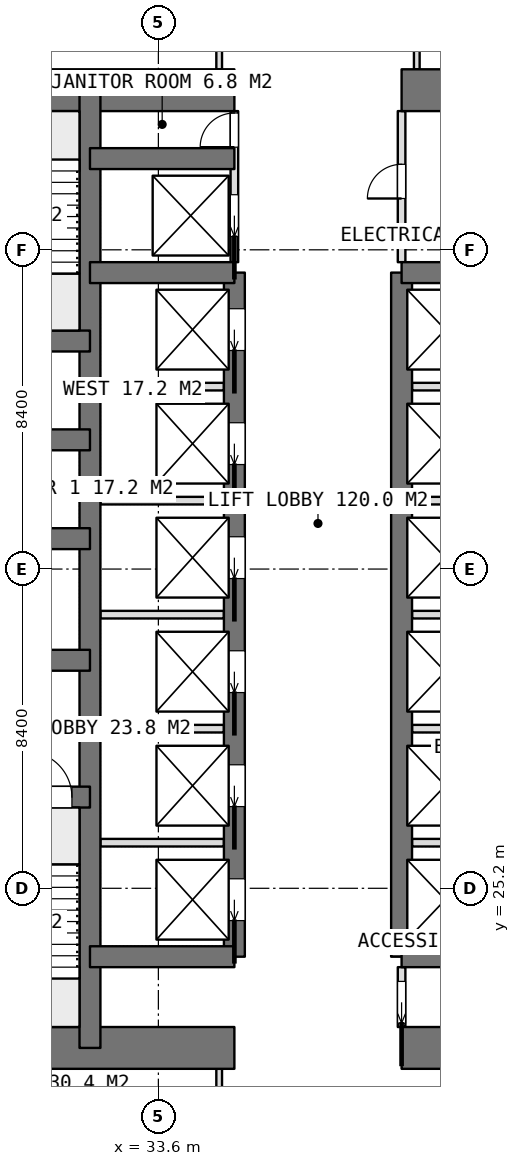
"""IFC4 building model, lengths in metres.
Left out: names, types, materials, properties, quantities, classifications, styles, units other than length and angle.
Written with IfcOpenShell. Run it as: python <this file> out.ifc"""

import sys

from ifc_helpers import new_model, si_unit, direction, frame, frame_2d, origin, place, context, subcontext, project, spatial, rectangle, extrude, element, fill, save


model = new_model("IFC4")
c1 = context("Model", 3, precision=1e-05, world=origin(), true_north=direction((0.0, 1.0)))
c2 = subcontext(c1, "Body", "Model", "MODEL_VIEW")
j1 = project(units=[si_unit("LENGTHUNIT", "METRE"), si_unit("PLANEANGLEUNIT", "RADIAN")], contexts=[c1])
p1 = place(None, origin())
s1 = spatial("IfcSite", under=j1, at=p1, CompositionType="ELEMENT")
p2 = place(p1, origin())
s2 = spatial("IfcBuilding", under=s1, at=p2, CompositionType="ELEMENT")
p3 = place(p2, frame((0.0, 0.0, 55.4)))
s3 = spatial("IfcBuildingStorey", under=s2, at=p3, CompositionType="ELEMENT", Elevation=55.4)
p4 = place(p3, frame((25.2, 21.0, 0.0), z_axis=(0.0, 0.0, 1.0), x_axis=(1.0, 0.0, 0.0)))
e1 = element("IfcWall", 1, at=p4, inside=s3, PredefinedType="SHEAR", context=c2, shape_type="SweptSolid", body=[
    extrude(rectangle(XDim=10.4, YDim=1.1, at=frame_2d((5.2, 0.0))), origin(), (0.0, 0.0, 1.0), 3.75),
])
p5 = place(p3, frame((40.0, 21.0, 0.0), z_axis=(0.0, 0.0, 1.0), x_axis=(1.0, 0.0, 0.0)))
e2 = element("IfcWall", 2, at=p5, inside=s3, PredefinedType="SHEAR", context=c2, shape_type="SweptSolid", body=[
    extrude(rectangle(XDim=10.4, YDim=1.1, at=frame_2d((5.2, 0.0))), origin(), (0.0, 0.0, 1.0), 3.75),
])
p6 = place(p3, frame((25.2, 46.2, 0.0), z_axis=(0.0, 0.0, 1.0), x_axis=(1.0, 0.0, 0.0)))
e3 = element("IfcWall", 3, at=p6, inside=s3, PredefinedType="SHEAR", context=c2, shape_type="SweptSolid", body=[
    extrude(rectangle(XDim=10.4, YDim=1.1, at=frame_2d((5.2, 0.0))), origin(), (0.0, 0.0, 1.0), 3.75),
])
p7 = place(p3, frame((40.0, 46.2, 0.0), z_axis=(0.0, 0.0, 1.0), x_axis=(1.0, 0.0, 0.0)))
e4 = element("IfcWall", 4, at=p7, inside=s3, PredefinedType="SHEAR", context=c2, shape_type="SweptSolid", body=[
    extrude(rectangle(XDim=10.4, YDim=1.1, at=frame_2d((5.2, 0.0))), origin(), (0.0, 0.0, 1.0), 3.75),
])
p8 = place(p3, frame((31.8, 21.0, 0.0), z_axis=(0.0, 0.0, 1.0), x_axis=(0.0, 1.0, 0.0)))
e5 = element("IfcWall", 5, at=p8, inside=s3, PredefinedType="SHEAR", context=c2, shape_type="SweptSolid", body=[
    extrude(rectangle(XDim=25.2, YDim=0.55, at=frame_2d((12.6, 0.0))), origin(), (0.0, 0.0, 1.0), 3.75),
])
p9 = place(p3, frame((35.6, 23.4, 0.0), z_axis=(0.0, 0.0, 1.0), x_axis=(0.0, 1.0, 0.0)))
e6 = element("IfcWall", 6, at=p9, inside=s3, PredefinedType="SHEAR", context=c2, shape_type="SweptSolid", body=[
    extrude(rectangle(XDim=18.0, YDim=0.55, at=frame_2d((9.0, 0.0))), origin(), (0.0, 0.0, 1.0), 3.75),
])
p10 = place(p9, frame((0.95, 0.0, 0.0)))
e7 = element("IfcOpeningElement", 7, at=p10, cuts=e6, PredefinedType="OPENING", context=c2, shape_type="SweptSolid", body=[
    extrude(rectangle(XDim=1.1, YDim=2.1, at=frame_2d((0.55, 1.05))), frame((0.0, 0.285, 0.0), z_axis=(0.0, -1.0, 0.0), x_axis=(1.0, 0.0, 0.0)), (0.0, 0.0, 1.0), 0.57),
])
p11 = place(p9, frame((3.95, 0.0, 0.0)))
e8 = element("IfcOpeningElement", 8, at=p11, cuts=e6, PredefinedType="OPENING", context=c2, shape_type="SweptSolid", body=[
    extrude(rectangle(XDim=1.1, YDim=2.1, at=frame_2d((0.55, 1.05))), frame((0.0, 0.285, 0.0), z_axis=(0.0, -1.0, 0.0), x_axis=(1.0, 0.0, 0.0)), (0.0, 0.0, 1.0), 0.57),
])
p12 = place(p9, frame((6.95, 0.0, 0.0)))
e9 = element("IfcOpeningElement", 9, at=p12, cuts=e6, PredefinedType="OPENING", context=c2, shape_type="SweptSolid", body=[
    extrude(rectangle(XDim=1.1, YDim=2.1, at=frame_2d((0.55, 1.05))), frame((0.0, 0.285, 0.0), z_axis=(0.0, -1.0, 0.0), x_axis=(1.0, 0.0, 0.0)), (0.0, 0.0, 1.0), 0.57),
])
p13 = place(p9, frame((9.95, 0.0, 0.0)))
e10 = element("IfcOpeningElement", 10, at=p13, cuts=e6, PredefinedType="OPENING", context=c2, shape_type="SweptSolid", body=[
    extrude(rectangle(XDim=1.1, YDim=2.1, at=frame_2d((0.55, 1.05))), frame((0.0, 0.285, 0.0), z_axis=(0.0, -1.0, 0.0), x_axis=(1.0, 0.0, 0.0)), (0.0, 0.0, 1.0), 0.57),
])
p14 = place(p9, frame((12.95, 0.0, 0.0)))
e11 = element("IfcOpeningElement", 11, at=p14, cuts=e6, PredefinedType="OPENING", context=c2, shape_type="SweptSolid", body=[
    extrude(rectangle(XDim=1.1, YDim=2.1, at=frame_2d((0.55, 1.05))), frame((0.0, 0.285, 0.0), z_axis=(0.0, -1.0, 0.0), x_axis=(1.0, 0.0, 0.0)), (0.0, 0.0, 1.0), 0.57),
])
p15 = place(p9, frame((15.95, 0.0, 0.0)))
e12 = element("IfcOpeningElement", 12, at=p15, cuts=e6, PredefinedType="OPENING", context=c2, shape_type="SweptSolid", body=[
    extrude(rectangle(XDim=1.1, YDim=2.1, at=frame_2d((0.55, 1.05))), frame((0.0, 0.285, 0.0), z_axis=(0.0, -1.0, 0.0), x_axis=(1.0, 0.0, 0.0)), (0.0, 0.0, 1.0), 0.57),
])
p16 = place(p3, frame((40.0, 23.4, 0.0), z_axis=(0.0, 0.0, 1.0), x_axis=(0.0, 1.0, 0.0)))
e13 = element("IfcWall", 13, at=p16, inside=s3, PredefinedType="SHEAR", context=c2, shape_type="SweptSolid", body=[
    extrude(rectangle(XDim=18.0, YDim=0.55, at=frame_2d((9.0, 0.0))), origin(), (0.0, 0.0, 1.0), 3.75),
])
for number, where, z_axis, x_axis in (
    (14, (31.8, 23.4, 0.0), (0.0, 0.0, 1.0), (1.0, 0.0, 0.0)),
    (15, (31.8, 41.4, 0.0), (0.0, 0.0, 1.0), (1.0, 0.0, 0.0)),
    (16, (31.8, 44.4, 0.0), (0.0, 0.0, 1.0), (1.0, 0.0, 0.0)),
    (17, (40.0, 23.4, 0.0), (0.0, 0.0, 1.0), (1.0, 0.0, 0.0)),
    (18, (40.0, 41.4, 0.0), (0.0, 0.0, 1.0), (1.0, 0.0, 0.0)),
):
    element("IfcWall", number, at=place(p3, frame(where, z_axis=z_axis, x_axis=x_axis)), inside=s3, PredefinedType="SHEAR", context=c2, shape_type="SweptSolid", body=[
        extrude(rectangle(XDim=3.8, YDim=0.55, at=frame_2d((1.9, 0.0))), origin(), (0.0, 0.0, 1.0), 3.75),
    ])
p17 = place(p3, frame((25.2, 27.6, 0.0), z_axis=(0.0, 0.0, 1.0), x_axis=(1.0, 0.0, 0.0)))
e19 = element("IfcWall", 19, at=p17, inside=s3, PredefinedType="SHEAR", context=c2, shape_type="SweptSolid", body=[
    extrude(rectangle(XDim=6.6, YDim=0.55, at=frame_2d((3.3, 0.0))), origin(), (0.0, 0.0, 1.0), 3.75),
])
p18 = place(p17, frame((4.925, 0.0, 0.0)))
e20 = element("IfcOpeningElement", 20, at=p18, cuts=e19, PredefinedType="OPENING", context=c2, shape_type="SweptSolid", body=[
    extrude(rectangle(XDim=1.2, YDim=2.1, at=frame_2d((0.6, 1.05))), frame((0.0, 0.285, 0.0), z_axis=(0.0, -1.0, 0.0), x_axis=(1.0, 0.0, 0.0)), (0.0, 0.0, 1.0), 0.57),
])
p19 = place(p3, frame((25.2, 31.2, 0.0), z_axis=(0.0, 0.0, 1.0), x_axis=(1.0, 0.0, 0.0)))
e21 = element("IfcWall", 21, at=p19, inside=s3, PredefinedType="SHEAR", context=c2, shape_type="SweptSolid", body=[
    extrude(rectangle(XDim=6.6, YDim=0.55, at=frame_2d((3.3, 0.0))), origin(), (0.0, 0.0, 1.0), 3.75),
])
p20 = place(p19, frame((2.65, 0.0, 0.0)))
e22 = element("IfcOpeningElement", 22, at=p20, cuts=e21, PredefinedType="OPENING", context=c2, shape_type="SweptSolid", body=[
    extrude(rectangle(XDim=1.3, YDim=2.1, at=frame_2d((0.65, 1.05))), frame((0.0, 0.285, 0.0), z_axis=(0.0, -1.0, 0.0), x_axis=(1.0, 0.0, 0.0)), (0.0, 0.0, 1.0), 0.57),
])
for number, where, z_axis, x_axis in (
    (23, (25.2, 34.4, 0.0), (0.0, 0.0, 1.0), (1.0, 0.0, 0.0)),
    (24, (25.2, 37.0, 0.0), (0.0, 0.0, 1.0), (1.0, 0.0, 0.0)),
    (25, (25.2, 39.6, 0.0), (0.0, 0.0, 1.0), (1.0, 0.0, 0.0)),
):
    element("IfcWall", number, at=place(p3, frame(where, z_axis=z_axis, x_axis=x_axis)), inside=s3, PredefinedType="SHEAR", context=c2, shape_type="SweptSolid", body=[
        extrude(rectangle(XDim=6.6, YDim=0.55, at=frame_2d((3.3, 0.0))), origin(), (0.0, 0.0, 1.0), 3.75),
    ])
for number, where, z_axis, x_axis in (
    (26, (32.075, 26.4, 0.0), (0.0, 0.0, 1.0), (1.0, 0.0, 0.0)),
    (27, (32.075, 29.4, 0.0), (0.0, 0.0, 1.0), (1.0, 0.0, 0.0)),
    (28, (32.075, 32.4, 0.0), (0.0, 0.0, 1.0), (1.0, 0.0, 0.0)),
    (29, (32.075, 35.4, 0.0), (0.0, 0.0, 1.0), (1.0, 0.0, 0.0)),
    (30, (32.075, 38.4, 0.0), (0.0, 0.0, 1.0), (1.0, 0.0, 0.0)),
    (31, (40.275, 26.4, 0.0), (0.0, 0.0, 1.0), (1.0, 0.0, 0.0)),
    (32, (40.275, 29.4, 0.0), (0.0, 0.0, 1.0), (1.0, 0.0, 0.0)),
    (33, (40.275, 32.4, 0.0), (0.0, 0.0, 1.0), (1.0, 0.0, 0.0)),
    (34, (40.275, 35.4, 0.0), (0.0, 0.0, 1.0), (1.0, 0.0, 0.0)),
    (35, (40.275, 38.4, 0.0), (0.0, 0.0, 1.0), (1.0, 0.0, 0.0)),
):
    element("IfcWall", number, at=place(p3, frame(where, z_axis=z_axis, x_axis=x_axis)), inside=s3, PredefinedType="PARTITIONING", context=c2, shape_type="SweptSolid", body=[
        extrude(rectangle(XDim=3.25, YDim=0.2, at=frame_2d((1.625, 0.0))), origin(), (0.0, 0.0, 1.0), 3.5),
    ])
p21 = place(p3, frame((40.0, 21.55, 0.0), z_axis=(0.0, 0.0, 1.0), x_axis=(0.0, 1.0, 0.0)))
e36 = element("IfcWall", 36, at=p21, inside=s3, PredefinedType="PARTITIONING", context=c2, shape_type="SweptSolid", body=[
    extrude(rectangle(XDim=1.575, YDim=0.2, at=frame_2d((0.788, 0.0))), origin(), (0.0, 0.0, 1.0), 3.5),
])
p22 = place(p21, frame((0.1, 0.0, 0.0)))
e37 = element("IfcOpeningElement", 37, at=p22, cuts=e36, PredefinedType="OPENING", context=c2, shape_type="SweptSolid", body=[
    extrude(rectangle(XDim=1.1, YDim=2.1, at=frame_2d((0.55, 1.05))), frame((0.0, 0.11, 0.0), z_axis=(0.0, -1.0, 0.0), x_axis=(1.0, 0.0, 0.0)), (0.0, 0.0, 1.0), 0.22),
])
p23 = place(p3, frame((40.0, 41.675, 0.0), z_axis=(0.0, 0.0, 1.0), x_axis=(0.0, 1.0, 0.0)))
e38 = element("IfcWall", 38, at=p23, inside=s3, PredefinedType="PARTITIONING", context=c2, shape_type="SweptSolid", body=[
    extrude(rectangle(XDim=3.975, YDim=0.2, at=frame_2d((1.987, 0.0))), origin(), (0.0, 0.0, 1.0), 3.5),
])
p24 = place(p23, frame((1.675, 0.0, 0.0)))
e39 = element("IfcOpeningElement", 39, at=p24, cuts=e38, PredefinedType="OPENING", context=c2, shape_type="SweptSolid", body=[
    extrude(rectangle(XDim=0.9, YDim=2.1, at=frame_2d((0.45, 1.05))), frame((0.0, 0.11, 0.0), z_axis=(0.0, -1.0, 0.0), x_axis=(1.0, 0.0, 0.0)), (0.0, 0.0, 1.0), 0.22),
])
p25 = place(p3, frame((35.6, 41.675, 0.0), z_axis=(0.0, 0.0, 1.0), x_axis=(0.0, 1.0, 0.0)))
e40 = element("IfcWall", 40, at=p25, inside=s3, PredefinedType="PARTITIONING", context=c2, shape_type="SweptSolid", body=[
    extrude(rectangle(XDim=3.975, YDim=0.2, at=frame_2d((1.987, 0.0))), origin(), (0.0, 0.0, 1.0), 3.5),
])
p26 = place(p25, frame((3.025, 0.0, 0.0)))
e41 = element("IfcOpeningElement", 41, at=p26, cuts=e40, PredefinedType="OPENING", context=c2, shape_type="SweptSolid", body=[
    extrude(rectangle(XDim=0.9, YDim=2.1, at=frame_2d((0.45, 1.05))), frame((0.0, 0.11, 0.0), z_axis=(0.0, -1.0, 0.0), x_axis=(1.0, 0.0, 0.0)), (0.0, 0.0, 1.0), 0.22),
])
p27 = place(p25, frame((0.675, 0.0, 0.0)))
e42 = element("IfcOpeningElement", 42, at=p27, cuts=e40, PredefinedType="OPENING", context=c2, shape_type="SweptSolid", body=[
    extrude(rectangle(XDim=1.1, YDim=2.1, at=frame_2d((0.55, 1.05))), frame((0.0, 0.11, 0.0), z_axis=(0.0, -1.0, 0.0), x_axis=(1.0, 0.0, 0.0)), (0.0, 0.0, 1.0), 0.22),
])
for number, where, z_axis, x_axis in (
    (43, (40.4, 46.75, 0.0), (0.0, 0.0, 1.0), (0.0, 1.0, 0.0)),
    (44, (35.2, 46.75, 0.0), (0.0, 0.0, 1.0), (0.0, 1.0, 0.0)),
    (45, (35.2, 17.875, 0.0), (0.0, 0.0, 1.0), (0.0, 1.0, 0.0)),
):
    element("IfcWall", number, at=place(p3, frame(where, z_axis=z_axis, x_axis=x_axis)), inside=s3, PredefinedType="PARTITIONING", context=c2, shape_type="SweptSolid", body=[
        extrude(rectangle(XDim=2.575, YDim=0.15, at=frame_2d((1.288, 0.0))), origin(), (0.0, 0.0, 1.0), 3.5),
    ])
p28 = place(p22, origin())
e46 = element("IfcDoor", 46, at=p28, inside=s3, OperationType="SLIDING_TO_LEFT", PredefinedType="DOOR", context=c2, shape_type="SweptSolid", body=[
    extrude(rectangle(XDim=1.1, YDim=2.1, at=frame_2d((0.55, 1.05))), frame((0.0, 0.025, 0.0), z_axis=(0.0, -1.0, 0.0), x_axis=(1.0, 0.0, 0.0)), (0.0, 0.0, 1.0), 0.05),
])
fill(e37, e46)
p29 = place(p24, origin())
e47 = element("IfcDoor", 47, at=p29, inside=s3, OperationType="SINGLE_SWING_LEFT", PredefinedType="DOOR", context=c2, shape_type="SweptSolid", body=[
    extrude(rectangle(XDim=0.9, YDim=2.1, at=frame_2d((0.45, 1.05))), frame((0.0, 0.025, 0.0), z_axis=(0.0, -1.0, 0.0), x_axis=(1.0, 0.0, 0.0)), (0.0, 0.0, 1.0), 0.05),
])
fill(e39, e47)
p30 = place(p26, origin())
e48 = element("IfcDoor", 48, at=p30, inside=s3, OperationType="SINGLE_SWING_LEFT", PredefinedType="DOOR", context=c2, shape_type="SweptSolid", body=[
    extrude(rectangle(XDim=0.9, YDim=2.1, at=frame_2d((0.45, 1.05))), frame((0.0, 0.025, 0.0), z_axis=(0.0, -1.0, 0.0), x_axis=(1.0, 0.0, 0.0)), (0.0, 0.0, 1.0), 0.05),
])
fill(e41, e48)
p31 = place(p10, origin())
e49 = element("IfcDoor", 49, at=p31, inside=s3, OperationType="SLIDING_TO_LEFT", PredefinedType="USERDEFINED", context=c2, shape_type="SweptSolid", body=[
    extrude(rectangle(XDim=1.1, YDim=2.1, at=frame_2d((0.55, 1.05))), frame((0.0, 0.025, 0.0), z_axis=(0.0, -1.0, 0.0), x_axis=(1.0, 0.0, 0.0)), (0.0, 0.0, 1.0), 0.05),
])
fill(e7, e49)
p32 = place(p11, origin())
e50 = element("IfcDoor", 50, at=p32, inside=s3, OperationType="SLIDING_TO_LEFT", PredefinedType="USERDEFINED", context=c2, shape_type="SweptSolid", body=[
    extrude(rectangle(XDim=1.1, YDim=2.1, at=frame_2d((0.55, 1.05))), frame((0.0, 0.025, 0.0), z_axis=(0.0, -1.0, 0.0), x_axis=(1.0, 0.0, 0.0)), (0.0, 0.0, 1.0), 0.05),
])
fill(e8, e50)
p33 = place(p12, origin())
e51 = element("IfcDoor", 51, at=p33, inside=s3, OperationType="SLIDING_TO_LEFT", PredefinedType="USERDEFINED", context=c2, shape_type="SweptSolid", body=[
    extrude(rectangle(XDim=1.1, YDim=2.1, at=frame_2d((0.55, 1.05))), frame((0.0, 0.025, 0.0), z_axis=(0.0, -1.0, 0.0), x_axis=(1.0, 0.0, 0.0)), (0.0, 0.0, 1.0), 0.05),
])
fill(e9, e51)
p34 = place(p13, origin())
e52 = element("IfcDoor", 52, at=p34, inside=s3, OperationType="SLIDING_TO_LEFT", PredefinedType="USERDEFINED", context=c2, shape_type="SweptSolid", body=[
    extrude(rectangle(XDim=1.1, YDim=2.1, at=frame_2d((0.55, 1.05))), frame((0.0, 0.025, 0.0), z_axis=(0.0, -1.0, 0.0), x_axis=(1.0, 0.0, 0.0)), (0.0, 0.0, 1.0), 0.05),
])
fill(e10, e52)
p35 = place(p14, origin())
e53 = element("IfcDoor", 53, at=p35, inside=s3, OperationType="SLIDING_TO_LEFT", PredefinedType="USERDEFINED", context=c2, shape_type="SweptSolid", body=[
    extrude(rectangle(XDim=1.1, YDim=2.1, at=frame_2d((0.55, 1.05))), frame((0.0, 0.025, 0.0), z_axis=(0.0, -1.0, 0.0), x_axis=(1.0, 0.0, 0.0)), (0.0, 0.0, 1.0), 0.05),
])
fill(e11, e53)
p36 = place(p15, origin())
e54 = element("IfcDoor", 54, at=p36, inside=s3, OperationType="SLIDING_TO_LEFT", PredefinedType="USERDEFINED", context=c2, shape_type="SweptSolid", body=[
    extrude(rectangle(XDim=1.1, YDim=2.1, at=frame_2d((0.55, 1.05))), frame((0.0, 0.025, 0.0), z_axis=(0.0, -1.0, 0.0), x_axis=(1.0, 0.0, 0.0)), (0.0, 0.0, 1.0), 0.05),
])
fill(e12, e54)
p37 = place(p27, origin())
e55 = element("IfcDoor", 55, at=p37, inside=s3, OperationType="SLIDING_TO_LEFT", PredefinedType="USERDEFINED", context=c2, shape_type="SweptSolid", body=[
    extrude(rectangle(XDim=1.1, YDim=2.1, at=frame_2d((0.55, 1.05))), frame((0.0, 0.025, 0.0), z_axis=(0.0, -1.0, 0.0), x_axis=(1.0, 0.0, 0.0)), (0.0, 0.0, 1.0), 0.05),
])
fill(e42, e55)
p38 = place(p18, origin())
e56 = element("IfcDoor", 56, at=p38, inside=s3, OperationType="SINGLE_SWING_RIGHT", PredefinedType="DOOR", context=c2, shape_type="SweptSolid", body=[
    extrude(rectangle(XDim=1.2, YDim=2.1, at=frame_2d((0.6, 1.05))), frame((0.0, 0.025, 0.0), z_axis=(0.0, -1.0, 0.0), x_axis=(1.0, 0.0, 0.0)), (0.0, 0.0, 1.0), 0.05),
])
fill(e20, e56)
save(model, sys.argv[1])
